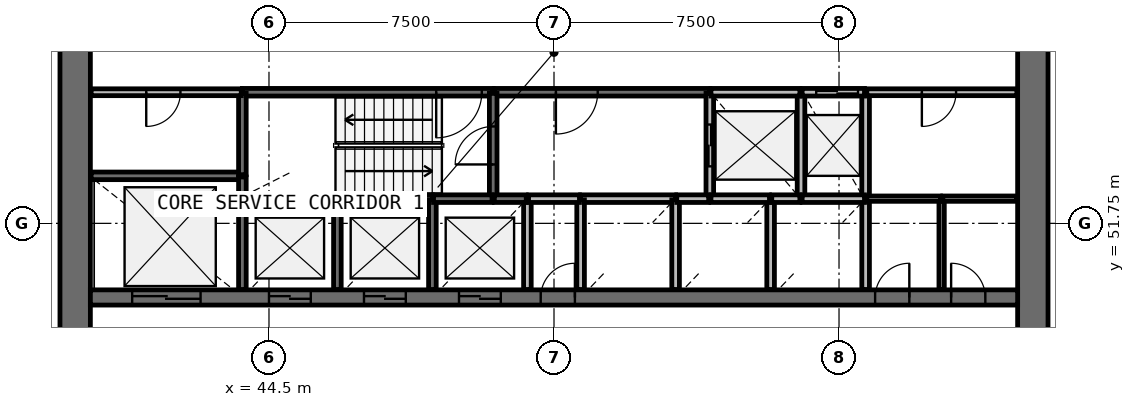
"""IFC4 building model, lengths in metres.
Left out: names, types, materials, properties, quantities, classifications, styles, units other than length and angle.
Written with IfcOpenShell. Run it as: python <this file> out.ifc"""

import sys

from ifc_helpers import new_model, si_unit, direction, frame, frame_2d, origin, place, context, subcontext, project, spatial, rectangle, extrude, source, transform, mapped, element, fill, save


model = new_model("IFC4")
c1 = context("Model", 3, precision=1e-05, world=origin(), true_north=direction((0.0, 1.0)))
c2 = subcontext(c1, "Body", "Model", "MODEL_VIEW")
j1 = project(units=[si_unit("LENGTHUNIT", "METRE"), si_unit("PLANEANGLEUNIT", "RADIAN")], contexts=[c1])
p1 = place(None, origin())
s1 = spatial("IfcSite", under=j1, at=p1, CompositionType="ELEMENT")
p2 = place(p1, origin())
s2 = spatial("IfcBuilding", under=s1, at=p2, CompositionType="ELEMENT")
p3 = place(p2, frame((0.0, 0.0, 88.0)))
s3 = spatial("IfcBuildingStorey", under=s2, at=p3, CompositionType="ELEMENT", Elevation=88.0)
p4 = place(p3, frame((64.6, 38.0, 0.0), z_axis=(0.0, 0.0, 1.0), x_axis=(0.0, 1.0, 0.0)))
e1 = element("IfcWall", 1, at=p4, inside=s3, PredefinedType="SHEAR", context=c2, shape_type="SweptSolid", body=[
    extrude(rectangle(XDim=20.0, YDim=0.8, at=frame_2d((10.0, 0.0))), origin(), (0.0, 0.0, 1.0), 4.1),
])
p5 = place(p4, frame((9.1, 0.0, 0.0)))
e2 = element("IfcOpeningElement", 2, at=p5, cuts=e1, PredefinedType="OPENING", context=c2, shape_type="SweptSolid", body=[
    extrude(rectangle(XDim=1.8, YDim=2.1, at=frame_2d((0.9, 1.05))), frame((0.0, 0.41, 0.0), z_axis=(0.0, -1.0, 0.0), x_axis=(1.0, 0.0, 0.0)), (0.0, 0.0, 1.0), 0.82),
])
p6 = place(p3, frame((39.4, 58.0, 0.0), z_axis=(0.0, 0.0, 1.0), x_axis=(0.0, -1.0, 0.0)))
e3 = element("IfcWall", 3, at=p6, inside=s3, PredefinedType="SHEAR", context=c2, shape_type="SweptSolid", body=[
    extrude(rectangle(XDim=20.0, YDim=0.8, at=frame_2d((10.0, 0.0))), origin(), (0.0, 0.0, 1.0), 4.1),
])
p7 = place(p6, frame((9.1, 0.0, 0.0)))
e4 = element("IfcOpeningElement", 4, at=p7, cuts=e3, PredefinedType="OPENING", context=c2, shape_type="SweptSolid", body=[
    extrude(rectangle(XDim=1.8, YDim=2.1, at=frame_2d((0.9, 1.05))), frame((0.0, 0.41, 0.0), z_axis=(0.0, -1.0, 0.0), x_axis=(1.0, 0.0, 0.0)), (0.0, 0.0, 1.0), 0.82),
])
p8 = place(p3, frame((39.8, 49.8, 0.0), z_axis=(0.0, 0.0, 1.0), x_axis=(1.0, 0.0, 0.0)))
e5 = element("IfcWall", 5, at=p8, inside=s3, PredefinedType="SHEAR", context=c2, shape_type="SweptSolid", body=[
    extrude(rectangle(XDim=24.4, YDim=0.4, at=frame_2d((12.2, 0.0))), origin(), (0.0, 0.0, 1.0), 4.1),
])
p9 = place(p8, frame((4.7, 0.0, 0.0)))
e6 = element("IfcOpeningElement", 6, at=p9, cuts=e5, PredefinedType="OPENING", context=c2, shape_type="SweptSolid", body=[
    extrude(rectangle(XDim=1.1, YDim=2.1, at=frame_2d((0.55, 1.05))), frame((0.0, 0.21, 0.0), z_axis=(0.0, -1.0, 0.0), x_axis=(1.0, 0.0, 0.0)), (0.0, 0.0, 1.0), 0.42),
])
p10 = place(p8, frame((7.2, 0.0, 0.0)))
e7 = element("IfcOpeningElement", 7, at=p10, cuts=e5, PredefinedType="OPENING", context=c2, shape_type="SweptSolid", body=[
    extrude(rectangle(XDim=1.1, YDim=2.1, at=frame_2d((0.55, 1.05))), frame((0.0, 0.21, 0.0), z_axis=(0.0, -1.0, 0.0), x_axis=(1.0, 0.0, 0.0)), (0.0, 0.0, 1.0), 0.42),
])
p11 = place(p8, frame((9.7, 0.0, 0.0)))
e8 = element("IfcOpeningElement", 8, at=p11, cuts=e5, PredefinedType="OPENING", context=c2, shape_type="SweptSolid", body=[
    extrude(rectangle(XDim=1.1, YDim=2.1, at=frame_2d((0.55, 1.05))), frame((0.0, 0.21, 0.0), z_axis=(0.0, -1.0, 0.0), x_axis=(1.0, 0.0, 0.0)), (0.0, 0.0, 1.0), 0.42),
])
p12 = place(p8, frame((1.1, 0.0, 0.0)))
e9 = element("IfcOpeningElement", 9, at=p12, cuts=e5, PredefinedType="OPENING", context=c2, shape_type="SweptSolid", body=[
    extrude(rectangle(XDim=1.8, YDim=2.4, at=frame_2d((0.9, 1.2))), frame((0.0, 0.21, 0.0), z_axis=(0.0, -1.0, 0.0), x_axis=(1.0, 0.0, 0.0)), (0.0, 0.0, 1.0), 0.42),
])
p13 = place(p8, frame((20.65, 0.0, 0.0)))
e10 = element("IfcOpeningElement", 10, at=p13, cuts=e5, PredefinedType="OPENING", context=c2, shape_type="SweptSolid", body=[
    extrude(rectangle(XDim=0.9, YDim=2.1, at=frame_2d((0.45, 1.05))), frame((0.0, 0.21, 0.0), z_axis=(0.0, -1.0, 0.0), x_axis=(1.0, 0.0, 0.0)), (0.0, 0.0, 1.0), 0.42),
])
p14 = place(p8, frame((22.65, 0.0, 0.0)))
e11 = element("IfcOpeningElement", 11, at=p14, cuts=e5, PredefinedType="OPENING", context=c2, shape_type="SweptSolid", body=[
    extrude(rectangle(XDim=0.9, YDim=2.1, at=frame_2d((0.45, 1.05))), frame((0.0, 0.21, 0.0), z_axis=(0.0, -1.0, 0.0), x_axis=(1.0, 0.0, 0.0)), (0.0, 0.0, 1.0), 0.42),
])
p15 = place(p8, frame((11.85, 0.0, 0.0)))
e12 = element("IfcOpeningElement", 12, at=p15, cuts=e5, PredefinedType="OPENING", context=c2, shape_type="SweptSolid", body=[
    extrude(rectangle(XDim=0.9, YDim=2.1, at=frame_2d((0.45, 1.05))), frame((0.0, 0.21, 0.0), z_axis=(0.0, -1.0, 0.0), x_axis=(1.0, 0.0, 0.0)), (0.0, 0.0, 1.0), 0.42),
])
p16 = place(p3, frame((50.4, 55.2, 0.0), z_axis=(0.0, 0.0, 1.0), x_axis=(-1.0, 0.0, 0.0)))
e13 = element("IfcWall", 13, at=p16, inside=s3, PredefinedType="SOLIDWALL", context=c2, shape_type="SweptSolid", body=[
    extrude(rectangle(XDim=6.6, YDim=0.2, at=frame_2d((3.3, 0.0))), origin(), (0.0, 0.0, 1.0), 3.7),
])
p17 = place(p16, frame((0.3, 0.0, 0.0)))
e14 = element("IfcOpeningElement", 14, at=p17, cuts=e13, PredefinedType="OPENING", context=c2, shape_type="SweptSolid", body=[
    extrude(rectangle(XDim=1.2, YDim=2.1, at=frame_2d((0.6, 1.05))), frame((0.0, 0.11, 0.0), z_axis=(0.0, -1.0, 0.0), x_axis=(1.0, 0.0, 0.0)), (0.0, 0.0, 1.0), 0.22),
])
p18 = place(p3, frame((56.1, 55.2, 0.0), z_axis=(0.0, 0.0, 1.0), x_axis=(-1.0, 0.0, 0.0)))
e15 = element("IfcWall", 15, at=p18, inside=s3, PredefinedType="SOLIDWALL", context=c2, shape_type="SweptSolid", body=[
    extrude(rectangle(XDim=5.67, YDim=0.2, at=frame_2d((2.835, 0.0))), origin(), (0.0, 0.0, 1.0), 3.7),
])
p19 = place(p18, frame((2.95, 0.0, 0.0)))
e16 = element("IfcOpeningElement", 16, at=p19, cuts=e15, PredefinedType="OPENING", context=c2, shape_type="SweptSolid", body=[
    extrude(rectangle(XDim=1.1, YDim=2.1, at=frame_2d((0.55, 1.05))), frame((0.0, 0.11, 0.0), z_axis=(0.0, -1.0, 0.0), x_axis=(1.0, 0.0, 0.0)), (0.0, 0.0, 1.0), 0.22),
])
p20 = place(p3, frame((43.8, 53.0, 0.0), z_axis=(0.0, 0.0, 1.0), x_axis=(-1.0, 0.0, 0.0)))
e17 = element("IfcWall", 17, at=p20, inside=s3, PredefinedType="SOLIDWALL", context=c2, shape_type="SweptSolid", body=[
    extrude(rectangle(XDim=3.98, YDim=0.2, at=frame_2d((1.99, 0.0))), origin(), (0.0, 0.0, 1.0), 3.7),
])
p21 = place(p3, frame((50.4, 52.4, 0.0), z_axis=(0.0, 0.0, 1.0), x_axis=(0.0, 1.0, 0.0)))
e18 = element("IfcWall", 18, at=p21, inside=s3, PredefinedType="SOLIDWALL", context=c2, shape_type="SweptSolid", body=[
    extrude(rectangle(XDim=2.77, YDim=0.2, at=frame_2d((1.385, 0.0))), origin(), (0.0, 0.0, 1.0), 3.7),
])
p22 = place(p21, frame((0.9, 0.0, 0.0)))
e19 = element("IfcOpeningElement", 19, at=p22, cuts=e18, PredefinedType="OPENING", context=c2, shape_type="SweptSolid", body=[
    extrude(rectangle(XDim=1.0, YDim=2.1, at=frame_2d((0.5, 1.05))), frame((0.0, 0.11, 0.0), z_axis=(0.0, -1.0, 0.0), x_axis=(1.0, 0.0, 0.0)), (0.0, 0.0, 1.0), 0.22),
])
p23 = place(p3, frame((56.1, 55.17, 0.0), z_axis=(0.0, 0.0, 1.0), x_axis=(0.0, -1.0, 0.0)))
e20 = element("IfcWall", 20, at=p23, inside=s3, PredefinedType="SOLIDWALL", context=c2, shape_type="SweptSolid", body=[
    extrude(rectangle(XDim=2.77, YDim=0.2, at=frame_2d((1.385, 0.0))), origin(), (0.0, 0.0, 1.0), 3.7),
])
p24 = place(p23, frame((0.82, 0.0, 0.0)))
e21 = element("IfcOpeningElement", 21, at=p24, cuts=e20, PredefinedType="OPENING", context=c2, shape_type="SweptSolid", body=[
    extrude(rectangle(XDim=1.1, YDim=2.1, at=frame_2d((0.55, 1.05))), frame((0.0, 0.11, 0.0), z_axis=(0.0, -1.0, 0.0), x_axis=(1.0, 0.0, 0.0)), (0.0, 0.0, 1.0), 0.22),
])
for number, where, z_axis, x_axis in (
    (22, (58.5, 52.4, 0.0), (0.0, 0.0, 1.0), (0.0, 1.0, 0.0)),
    (23, (60.2, 52.4, 0.0), (0.0, 0.0, 1.0), (0.0, 1.0, 0.0)),
):
    element("IfcWall", number, at=place(p3, frame(where, z_axis=z_axis, x_axis=x_axis)), inside=s3, PredefinedType="SOLIDWALL", context=c2, shape_type="SweptSolid", body=[
        extrude(rectangle(XDim=2.8, YDim=0.2, at=frame_2d((1.4, 0.0))), origin(), (0.0, 0.0, 1.0), 3.7),
    ])
p25 = place(p3, frame((46.3, 52.4, 0.0), z_axis=(0.0, 0.0, 1.0), x_axis=(-1.0, 0.0, 0.0)))
e24 = element("IfcWall", 24, at=p25, inside=s3, PredefinedType="SOLIDWALL", context=c2, shape_type="SweptSolid", body=[
    extrude(rectangle(XDim=2.5, YDim=0.2, at=frame_2d((1.25, 0.0))), origin(), (0.0, 0.0, 1.0), 3.7),
])
p26 = place(p3, frame((48.8, 52.4, 0.0), z_axis=(0.0, 0.0, 1.0), x_axis=(-1.0, 0.0, 0.0)))
e25 = element("IfcWall", 25, at=p26, inside=s3, PredefinedType="SOLIDWALL", context=c2, shape_type="SweptSolid", body=[
    extrude(rectangle(XDim=2.47, YDim=0.2, at=frame_2d((1.235, 0.0))), origin(), (0.0, 0.0, 1.0), 3.7),
])
p27 = place(p3, frame((55.2, 52.4, 0.0), z_axis=(0.0, 0.0, 1.0), x_axis=(-1.0, 0.0, 0.0)))
e26 = element("IfcWall", 26, at=p27, inside=s3, PredefinedType="SOLIDWALL", context=c2, shape_type="SweptSolid", body=[
    extrude(rectangle(XDim=2.5, YDim=0.2, at=frame_2d((1.25, 0.0))), origin(), (0.0, 0.0, 1.0), 3.7),
])
p28 = place(p3, frame((58.47, 55.2, 0.0), z_axis=(0.0, 0.0, 1.0), x_axis=(-1.0, 0.0, 0.0)))
e27 = element("IfcWall", 27, at=p28, inside=s3, PredefinedType="SOLIDWALL", context=c2, shape_type="SweptSolid", body=[
    extrude(rectangle(XDim=2.34, YDim=0.2, at=frame_2d((1.17, 0.0))), origin(), (0.0, 0.0, 1.0), 3.7),
])
for number, where, z_axis, x_axis in (
    (28, (43.8, 52.37, 0.0), (0.0, 0.0, 1.0), (0.0, -1.0, 0.0)),
    (29, (46.3, 50.01, 0.0), (0.0, 0.0, 1.0), (0.0, 1.0, 0.0)),
    (30, (48.8, 50.01, 0.0), (0.0, 0.0, 1.0), (0.0, 1.0, 0.0)),
):
    element("IfcWall", number, at=place(p3, frame(where, z_axis=z_axis, x_axis=x_axis)), inside=s3, PredefinedType="SOLIDWALL", context=c2, shape_type="SweptSolid", body=[
        extrude(rectangle(XDim=2.36, YDim=0.2, at=frame_2d((1.18, 0.0))), origin(), (0.0, 0.0, 1.0), 3.7),
    ])
p29 = place(p3, frame((51.3, 50.01, 0.0), z_axis=(0.0, 0.0, 1.0), x_axis=(0.0, 1.0, 0.0)))
e31 = element("IfcWall", 31, at=p29, inside=s3, PredefinedType="SOLIDWALL", context=c2, shape_type="SweptSolid", body=[
    extrude(rectangle(XDim=2.39, YDim=0.2, at=frame_2d((1.195, 0.0))), origin(), (0.0, 0.0, 1.0), 3.7),
])
for number, where, z_axis, x_axis in (
    (32, (52.7, 52.37, 0.0), (0.0, 0.0, 1.0), (0.0, -1.0, 0.0)),
    (33, (55.2, 50.01, 0.0), (0.0, 0.0, 1.0), (0.0, 1.0, 0.0)),
):
    element("IfcWall", number, at=place(p3, frame(where, z_axis=z_axis, x_axis=x_axis)), inside=s3, PredefinedType="SOLIDWALL", context=c2, shape_type="SweptSolid", body=[
        extrude(rectangle(XDim=2.36, YDim=0.2, at=frame_2d((1.18, 0.0))), origin(), (0.0, 0.0, 1.0), 3.7),
    ])
p30 = place(p3, frame((57.7, 50.01, 0.0), z_axis=(0.0, 0.0, 1.0), x_axis=(0.0, 1.0, 0.0)))
e34 = element("IfcWall", 34, at=p30, inside=s3, PredefinedType="SOLIDWALL", context=c2, shape_type="SweptSolid", body=[
    extrude(rectangle(XDim=2.39, YDim=0.2, at=frame_2d((1.195, 0.0))), origin(), (0.0, 0.0, 1.0), 3.7),
])
p31 = place(p3, frame((60.2, 50.01, 0.0), z_axis=(0.0, 0.0, 1.0), x_axis=(0.0, 1.0, 0.0)))
e35 = element("IfcWall", 35, at=p31, inside=s3, PredefinedType="SOLIDWALL", context=c2, shape_type="SweptSolid", body=[
    extrude(rectangle(XDim=2.36, YDim=0.2, at=frame_2d((1.18, 0.0))), origin(), (0.0, 0.0, 1.0), 3.7),
])
p32 = place(p3, frame((43.8, 55.17, 0.0), z_axis=(0.0, 0.0, 1.0), x_axis=(0.0, -1.0, 0.0)))
e36 = element("IfcWall", 36, at=p32, inside=s3, PredefinedType="SOLIDWALL", context=c2, shape_type="SweptSolid", body=[
    extrude(rectangle(XDim=2.14, YDim=0.2, at=frame_2d((1.07, 0.0))), origin(), (0.0, 0.0, 1.0), 3.7),
])
p33 = place(p3, frame((60.17, 52.4, 0.0), z_axis=(0.0, 0.0, 1.0), x_axis=(-1.0, 0.0, 0.0)))
e37 = element("IfcWall", 37, at=p33, inside=s3, PredefinedType="SOLIDWALL", context=c2, shape_type="SweptSolid", body=[
    extrude(rectangle(XDim=1.64, YDim=0.2, at=frame_2d((0.82, 0.0))), origin(), (0.0, 0.0, 1.0), 3.7),
])
p34 = place(p3, frame((60.17, 55.2, 0.0), z_axis=(0.0, 0.0, 1.0), x_axis=(-1.0, 0.0, 0.0)))
e38 = element("IfcWall", 38, at=p34, inside=s3, PredefinedType="SOLIDWALL", context=c2, shape_type="SweptSolid", body=[
    extrude(rectangle(XDim=1.64, YDim=0.2, at=frame_2d((0.82, 0.0))), origin(), (0.0, 0.0, 1.0), 3.7),
])
p35 = place(p34, frame((0.17, 0.0, 0.0)))
e39 = element("IfcOpeningElement", 39, at=p35, cuts=e38, PredefinedType="OPENING", context=c2, shape_type="SweptSolid", body=[
    extrude(rectangle(XDim=1.1, YDim=2.1, at=frame_2d((0.55, 1.05))), frame((0.0, 0.11, 0.0), z_axis=(0.0, -1.0, 0.0), x_axis=(1.0, 0.0, 0.0)), (0.0, 0.0, 1.0), 0.22),
])
for number, where, z_axis, x_axis in (
    (40, (50.37, 52.4, 0.0), (0.0, 0.0, 1.0), (-1.0, 0.0, 0.0)),
    (41, (57.67, 52.4, 0.0), (0.0, 0.0, 1.0), (-1.0, 0.0, 0.0)),
):
    element("IfcWall", number, at=place(p3, frame(where, z_axis=z_axis, x_axis=x_axis)), inside=s3, PredefinedType="SOLIDWALL", context=c2, shape_type="SweptSolid", body=[
        extrude(rectangle(XDim=1.54, YDim=0.2, at=frame_2d((0.77, 0.0))), origin(), (0.0, 0.0, 1.0), 3.7),
    ])
p36 = place(p3, frame((51.33, 52.4, 0.0), z_axis=(0.0, 0.0, 1.0), x_axis=(1.0, 0.0, 0.0)))
e42 = element("IfcWall", 42, at=p36, inside=s3, PredefinedType="SOLIDWALL", context=c2, shape_type="SweptSolid", body=[
    extrude(rectangle(XDim=1.34, YDim=0.2, at=frame_2d((0.67, 0.0))), origin(), (0.0, 0.0, 1.0), 3.7),
])
for number, where, z_axis, x_axis in (
    (43, (51.27, 52.4, 0.0), (0.0, 0.0, 1.0), (-1.0, 0.0, 0.0)),
    (44, (56.07, 52.4, 0.0), (0.0, 0.0, 1.0), (-1.0, 0.0, 0.0)),
):
    element("IfcWall", number, at=place(p3, frame(where, z_axis=z_axis, x_axis=x_axis)), inside=s3, PredefinedType="SOLIDWALL", context=c2, shape_type="SweptSolid", body=[
        extrude(rectangle(XDim=0.84, YDim=0.2, at=frame_2d((0.42, 0.0))), origin(), (0.0, 0.0, 1.0), 3.7),
    ])
p37 = place(p3, frame((58.47, 52.4, 0.0), z_axis=(0.0, 0.0, 1.0), x_axis=(-1.0, 0.0, 0.0)))
e45 = element("IfcWall", 45, at=p37, inside=s3, PredefinedType="SOLIDWALL", context=c2, shape_type="SweptSolid", body=[
    extrude(rectangle(XDim=0.74, YDim=0.2, at=frame_2d((0.37, 0.0))), origin(), (0.0, 0.0, 1.0), 3.7),
])
p38 = place(p3, frame((43.8, 52.43, 0.0), z_axis=(0.0, 0.0, 1.0), x_axis=(0.0, 1.0, 0.0)))
e46 = element("IfcWall", 46, at=p38, inside=s3, PredefinedType="SOLIDWALL", context=c2, shape_type="SweptSolid", body=[
    extrude(rectangle(XDim=0.54, YDim=0.2, at=frame_2d((0.27, 0.0))), origin(), (0.0, 0.0, 1.0), 3.7),
])
p39 = place(p3, frame((64.18, 55.2, 0.0), z_axis=(0.0, 0.0, 1.0), x_axis=(-1.0, 0.0, 0.0)))
e47 = element("IfcWall", 47, at=p39, inside=s3, PredefinedType="PARTITIONING", context=c2, shape_type="SweptSolid", body=[
    extrude(rectangle(XDim=3.95, YDim=0.18, at=frame_2d((1.975, 0.0))), origin(), (0.0, 0.0, 1.0), 3.7),
])
p40 = place(p39, frame((1.6, 0.0, 0.0)))
e48 = element("IfcOpeningElement", 48, at=p40, cuts=e47, PredefinedType="OPENING", context=c2, shape_type="SweptSolid", body=[
    extrude(rectangle(XDim=0.9, YDim=2.1, at=frame_2d((0.45, 1.05))), frame((0.0, 0.1, 0.0), z_axis=(0.0, -1.0, 0.0), x_axis=(1.0, 0.0, 0.0)), (0.0, 0.0, 1.0), 0.2),
])
p41 = place(p3, frame((43.77, 55.2, 0.0), z_axis=(0.0, 0.0, 1.0), x_axis=(-1.0, 0.0, 0.0)))
e49 = element("IfcWall", 49, at=p41, inside=s3, PredefinedType="PARTITIONING", context=c2, shape_type="SweptSolid", body=[
    extrude(rectangle(XDim=3.95, YDim=0.18, at=frame_2d((1.975, 0.0))), origin(), (0.0, 0.0, 1.0), 3.7),
])
p42 = place(p41, frame((1.6, 0.0, 0.0)))
e50 = element("IfcOpeningElement", 50, at=p42, cuts=e49, PredefinedType="OPENING", context=c2, shape_type="SweptSolid", body=[
    extrude(rectangle(XDim=0.9, YDim=2.1, at=frame_2d((0.45, 1.05))), frame((0.0, 0.1, 0.0), z_axis=(0.0, -1.0, 0.0), x_axis=(1.0, 0.0, 0.0)), (0.0, 0.0, 1.0), 0.2),
])
p43 = place(p3, frame((62.2, 50.01, 0.0), z_axis=(0.0, 0.0, 1.0), x_axis=(0.0, 1.0, 0.0)))
e51 = element("IfcWall", 51, at=p43, inside=s3, PredefinedType="PARTITIONING", context=c2, shape_type="SweptSolid", body=[
    extrude(rectangle(XDim=2.39, YDim=0.14, at=frame_2d((1.195, 0.0))), origin(), (0.0, 0.0, 1.0), 2.9),
])
p44 = place(p3, frame((62.17, 52.4, 0.0), z_axis=(0.0, 0.0, 1.0), x_axis=(-1.0, 0.0, 0.0)))
e52 = element("IfcWall", 52, at=p44, inside=s3, PredefinedType="PARTITIONING", context=c2, shape_type="SweptSolid", body=[
    extrude(rectangle(XDim=1.94, YDim=0.14, at=frame_2d((0.97, 0.0))), origin(), (0.0, 0.0, 1.0), 2.9),
])
p45 = place(p3, frame((64.18, 52.4, 0.0), z_axis=(0.0, 0.0, 1.0), x_axis=(-1.0, 0.0, 0.0)))
e53 = element("IfcWall", 53, at=p45, inside=s3, PredefinedType="PARTITIONING", context=c2, shape_type="SweptSolid", body=[
    extrude(rectangle(XDim=1.95, YDim=0.14, at=frame_2d((0.975, 0.0))), origin(), (0.0, 0.0, 1.0), 2.9),
])
m1 = source(origin(), c2, "Body", "SweptSolid", [
    extrude(rectangle(XDim=1.1, YDim=2.1, at=frame_2d((0.55, 1.05))), frame((0.0, 0.025, 0.0), z_axis=(0.0, -1.0, 0.0), x_axis=(1.0, 0.0, 0.0)), (0.0, 0.0, 1.0), 0.05),
])
p46 = place(p9, origin())
e54 = element("IfcDoor", 54, at=p46, inside=s3, OperationType="DOUBLE_DOOR_SLIDING", PredefinedType="USERDEFINED", context=c2, shape_type="MappedRepresentation", body=[
    mapped(m1, transform((0.0, 0.0, 0.0), scale=1.0)),
])
fill(e6, e54)
p47 = place(p10, origin())
e55 = element("IfcDoor", 55, at=p47, inside=s3, OperationType="DOUBLE_DOOR_SLIDING", PredefinedType="USERDEFINED", context=c2, shape_type="MappedRepresentation", body=[
    mapped(m1, transform((0.0, 0.0, 0.0), scale=1.0)),
])
fill(e7, e55)
p48 = place(p11, origin())
e56 = element("IfcDoor", 56, at=p48, inside=s3, OperationType="DOUBLE_DOOR_SLIDING", PredefinedType="USERDEFINED", context=c2, shape_type="MappedRepresentation", body=[
    mapped(m1, transform((0.0, 0.0, 0.0), scale=1.0)),
])
fill(e8, e56)
p49 = place(p24, origin())
e57 = element("IfcDoor", 57, at=p49, inside=s3, OperationType="DOUBLE_DOOR_SLIDING", PredefinedType="USERDEFINED", context=c2, shape_type="MappedRepresentation", body=[
    mapped(m1, transform((0.0, 0.0, 0.0), scale=1.0)),
])
fill(e21, e57)
p50 = place(p35, origin())
e58 = element("IfcDoor", 58, at=p50, inside=s3, OperationType="DOUBLE_DOOR_SLIDING", PredefinedType="USERDEFINED", context=c2, shape_type="MappedRepresentation", body=[
    mapped(m1, transform((0.0, 0.0, 0.0), scale=1.0)),
])
fill(e39, e58)
m2 = source(origin(), c2, "Body", "SweptSolid", [
    extrude(rectangle(XDim=1.8, YDim=2.4, at=frame_2d((0.9, 1.2))), frame((0.0, 0.025, 0.0), z_axis=(0.0, -1.0, 0.0), x_axis=(1.0, 0.0, 0.0)), (0.0, 0.0, 1.0), 0.05),
])
p51 = place(p12, origin())
e59 = element("IfcDoor", 59, at=p51, inside=s3, OperationType="DOUBLE_DOOR_SLIDING", PredefinedType="USERDEFINED", context=c2, shape_type="MappedRepresentation", body=[
    mapped(m2, transform((0.0, 0.0, 0.0), scale=1.0)),
])
fill(e9, e59)
m3 = source(origin(), c2, "Body", "SweptSolid", [
    extrude(rectangle(XDim=1.2, YDim=2.1, at=frame_2d((0.6, 1.05))), frame((0.0, 0.025, 0.0), z_axis=(0.0, -1.0, 0.0), x_axis=(1.0, 0.0, 0.0)), (0.0, 0.0, 1.0), 0.05),
])
p52 = place(p17, origin())
e60 = element("IfcDoor", 60, at=p52, inside=s3, OperationType="SINGLE_SWING_RIGHT", PredefinedType="DOOR", context=c2, shape_type="MappedRepresentation", body=[
    mapped(m3, transform((0.0, 0.0, 0.0), scale=1.0)),
])
fill(e14, e60)
m4 = source(origin(), c2, "Body", "SweptSolid", [
    extrude(rectangle(XDim=1.0, YDim=2.1, at=frame_2d((0.5, 1.05))), frame((0.0, 0.025, 0.0), z_axis=(0.0, -1.0, 0.0), x_axis=(1.0, 0.0, 0.0)), (0.0, 0.0, 1.0), 0.05),
])
p53 = place(p22, origin())
e61 = element("IfcDoor", 61, at=p53, inside=s3, OperationType="SINGLE_SWING_LEFT", PredefinedType="DOOR", context=c2, shape_type="MappedRepresentation", body=[
    mapped(m4, transform((0.0, 0.0, 0.0), scale=1.0)),
])
fill(e19, e61)
m5 = source(origin(), c2, "Body", "SweptSolid", [
    extrude(rectangle(XDim=1.1, YDim=2.1, at=frame_2d((0.55, 1.05))), frame((0.0, 0.025, 0.0), z_axis=(0.0, -1.0, 0.0), x_axis=(1.0, 0.0, 0.0)), (0.0, 0.0, 1.0), 0.05),
])
p54 = place(p19, origin())
e62 = element("IfcDoor", 62, at=p54, inside=s3, OperationType="SINGLE_SWING_RIGHT", PredefinedType="DOOR", context=c2, shape_type="MappedRepresentation", body=[
    mapped(m5, transform((0.0, 0.0, 0.0), scale=1.0)),
])
fill(e16, e62)
m6 = source(origin(), c2, "Body", "SweptSolid", [
    extrude(rectangle(XDim=0.9, YDim=2.1, at=frame_2d((0.45, 1.05))), frame((0.0, 0.025, 0.0), z_axis=(0.0, -1.0, 0.0), x_axis=(1.0, 0.0, 0.0)), (0.0, 0.0, 1.0), 0.05),
])
p55 = place(p42, origin())
e63 = element("IfcDoor", 63, at=p55, inside=s3, OperationType="SINGLE_SWING_RIGHT", PredefinedType="DOOR", context=c2, shape_type="MappedRepresentation", body=[
    mapped(m6, transform((0.0, 0.0, 0.0), scale=1.0)),
])
fill(e50, e63)
p56 = place(p13, origin())
e64 = element("IfcDoor", 64, at=p56, inside=s3, OperationType="SINGLE_SWING_RIGHT", PredefinedType="DOOR", context=c2, shape_type="MappedRepresentation", body=[
    mapped(m6, transform((0.0, 0.0, 0.0), scale=1.0)),
])
fill(e10, e64)
p57 = place(p14, origin())
e65 = element("IfcDoor", 65, at=p57, inside=s3, OperationType="SINGLE_SWING_LEFT", PredefinedType="DOOR", context=c2, shape_type="MappedRepresentation", body=[
    mapped(m6, transform((0.0, 0.0, 0.0), scale=1.0)),
])
fill(e11, e65)
p58 = place(p40, origin())
e66 = element("IfcDoor", 66, at=p58, inside=s3, OperationType="SINGLE_SWING_RIGHT", PredefinedType="DOOR", context=c2, shape_type="MappedRepresentation", body=[
    mapped(m6, transform((0.0, 0.0, 0.0), scale=1.0)),
])
fill(e48, e66)
p59 = place(p15, origin())
e67 = element("IfcDoor", 67, at=p59, inside=s3, OperationType="SINGLE_SWING_RIGHT", PredefinedType="DOOR", context=c2, shape_type="MappedRepresentation", body=[
    mapped(m6, transform((0.0, 0.0, 0.0), scale=1.0)),
])
fill(e12, e67)
save(model, sys.argv[1])
